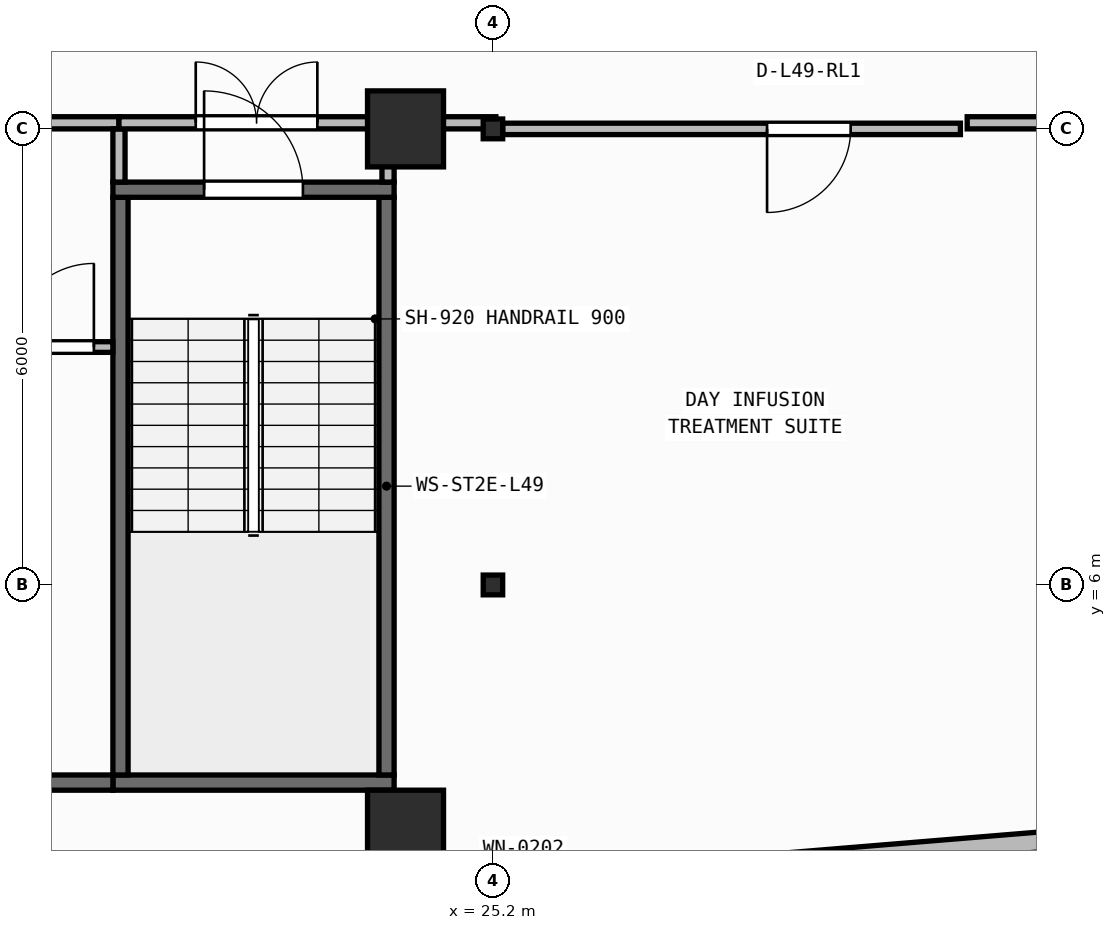
"""IFC4 building model, lengths in metres.
Left out: names, types, materials, properties, quantities, classifications, styles, units other than length and angle.
Written with IfcOpenShell. Run it as: python <this file> out.ifc"""

import sys

from ifc_helpers import new_model, si_unit, direction, frame, frame_2d, origin, origin_2d, place, context, subcontext, project, spatial, rectangle, i_section, extrude, element, fill, save


model = new_model("IFC4")
c1 = context("Model", 3, precision=1e-05, world=origin(), true_north=direction((0.0, 1.0)))
c2 = subcontext(c1, "Body", "Model", "MODEL_VIEW")
j1 = project(units=[si_unit("LENGTHUNIT", "METRE"), si_unit("PLANEANGLEUNIT", "RADIAN")], contexts=[c1])
p1 = place(None, origin())
s1 = spatial("IfcSite", under=j1, at=p1, CompositionType="ELEMENT")
p2 = place(p1, origin())
s2 = spatial("IfcBuilding", under=s1, at=p2, CompositionType="ELEMENT")
p3 = place(p2, frame((0.0, 0.0, 200.0)))
s3 = spatial("IfcBuildingStorey", under=s2, at=p3, CompositionType="ELEMENT", Elevation=200.0)
p4 = place(p3, frame((24.05, 2.8, 0.0), z_axis=(0.0, 0.0, 1.0), x_axis=(1.0, 0.0, 0.0)))
e1 = element("IfcColumn", 1, at=p4, inside=s3, PredefinedType="COLUMN", context=c2, shape_type="SweptSolid", body=[
    extrude(rectangle(XDim=1.0, YDim=1.0, at=origin_2d()), origin(), (0.0, 0.0, 1.0), 3.95),
])
p5 = place(p3, frame((25.2, 6.0, 0.0), z_axis=(0.0, 0.0, 1.0), x_axis=(1.0, 0.0, 0.0)))
e2 = element("IfcColumn", 2, at=p5, inside=s3, PredefinedType="COLUMN", context=c2, shape_type="SweptSolid", body=[
    extrude(i_section(OverallWidth=0.256, OverallDepth=0.26, WebThickness=0.01, FlangeThickness=0.017, FilletRadius=0.013, at=origin_2d()), origin(), (0.0, 0.0, 1.0), 3.95),
])
p6 = place(p3, frame((24.05, 12.0, 0.0), z_axis=(0.0, 0.0, 1.0), x_axis=(1.0, 0.0, 0.0)))
e3 = element("IfcColumn", 3, at=p6, inside=s3, PredefinedType="COLUMN", context=c2, shape_type="SweptSolid", body=[
    extrude(rectangle(XDim=1.0, YDim=1.0, at=origin_2d()), origin(), (0.0, 0.0, 1.0), 3.95),
])
p7 = place(p3, frame((25.2, 12.0, 0.0), z_axis=(0.0, 0.0, 1.0), x_axis=(1.0, 0.0, 0.0)))
e4 = element("IfcColumn", 4, at=p7, inside=s3, PredefinedType="COLUMN", context=c2, shape_type="SweptSolid", body=[
    extrude(i_section(OverallWidth=0.256, OverallDepth=0.26, WebThickness=0.01, FlangeThickness=0.017, FilletRadius=0.013, at=origin_2d()), origin(), (0.0, 0.0, 1.0), 3.95),
])
p8 = place(p3, frame((2.66, 0.174, 0.0), z_axis=(0.0, 0.0, 1.0), x_axis=(0.996634028439, 0.081979347142, 0.0)))
e5 = element("IfcWall", 5, at=p8, inside=s3, PredefinedType="STANDARD", context=c2, shape_type="SweptSolid", body=[
    extrude(rectangle(XDim=46.035, YDim=0.26, at=frame_2d((23.018, 0.0))), origin(), (0.0, 0.0, 1.0), 3.71),
])
p9 = place(p8, frame((21.817, 0.0, 0.9)))
e6 = element("IfcOpeningElement", 6, at=p9, cuts=e5, PredefinedType="OPENING", context=c2, shape_type="SweptSolid", body=[
    extrude(rectangle(XDim=2.4, YDim=1.65, at=frame_2d((1.2, 0.825))), frame((0.0, 0.14, 0.0), z_axis=(0.0, -1.0, 0.0), x_axis=(1.0, 0.0, 0.0)), (0.0, 0.0, 1.0), 0.28),
])
p10 = place(p3, frame((20.2, 3.4, 0.0), z_axis=(0.0, 0.0, 1.0), x_axis=(1.0, 0.0, 0.0)))
e7 = element("IfcWall", 7, at=p10, inside=s3, PredefinedType="SHEAR", context=c2, shape_type="SweptSolid", body=[
    extrude(rectangle(XDim=3.7, YDim=0.2, at=frame_2d((1.85, 0.0))), origin(), (0.0, 0.0, 1.0), 3.71),
])
for number, where, z_axis, x_axis in (
    (8, (20.3, 3.5, 0.0), (0.0, 0.0, 1.0), (0.0, 1.0, 0.0)),
    (9, (23.8, 3.5, 0.0), (0.0, 0.0, 1.0), (0.0, 1.0, 0.0)),
):
    element("IfcWall", number, at=place(p3, frame(where, z_axis=z_axis, x_axis=x_axis)), inside=s3, PredefinedType="SHEAR", context=c2, shape_type="SweptSolid", body=[
        extrude(rectangle(XDim=7.6, YDim=0.2, at=frame_2d((3.8, 0.0))), origin(), (0.0, 0.0, 1.0), 3.71),
    ])
p11 = place(p3, frame((20.2, 11.2, 0.0), z_axis=(0.0, 0.0, 1.0), x_axis=(1.0, 0.0, 0.0)))
e10 = element("IfcWall", 10, at=p11, inside=s3, PredefinedType="SHEAR", context=c2, shape_type="SweptSolid", body=[
    extrude(rectangle(XDim=3.7, YDim=0.2, at=frame_2d((1.85, 0.0))), origin(), (0.0, 0.0, 1.0), 3.71),
])
p12 = place(p11, frame((1.2, 0.0, 0.0)))
e11 = element("IfcOpeningElement", 11, at=p12, cuts=e10, PredefinedType="OPENING", context=c2, shape_type="SweptSolid", body=[
    extrude(rectangle(XDim=1.3, YDim=2.15, at=frame_2d((0.65, 1.075))), frame((0.0, 0.11, 0.0), z_axis=(0.0, -1.0, 0.0), x_axis=(1.0, 0.0, 0.0)), (0.0, 0.0, 1.0), 0.22),
])
p13 = place(p3, frame((6.5, 3.4, 0.0), z_axis=(0.0, 0.0, 1.0), x_axis=(1.0, 0.0, 0.0)))
e12 = element("IfcWall", 12, at=p13, inside=s3, PredefinedType="SHEAR", context=c2, shape_type="SweptSolid", body=[
    extrude(rectangle(XDim=13.7, YDim=0.2, at=frame_2d((6.85, 0.0))), origin(), (0.0, 0.0, 1.0), 3.71),
])
p14 = place(p3, frame((18.61, 9.13, 0.0), z_axis=(0.0, 0.0, 1.0), x_axis=(1.0, 0.0, 0.0)))
e13 = element("IfcWall", 13, at=p14, inside=s3, PredefinedType="PARTITIONING", context=c2, shape_type="SweptSolid", body=[
    extrude(rectangle(XDim=1.59, YDim=0.14, at=frame_2d((0.795, 0.0))), origin(), (0.0, 0.0, 1.0), 3.71),
])
p15 = place(p14, frame((0.24, 0.0, 0.0)))
e14 = element("IfcOpeningElement", 14, at=p15, cuts=e13, PredefinedType="OPENING", context=c2, shape_type="SweptSolid", body=[
    extrude(rectangle(XDim=1.1, YDim=2.1, at=frame_2d((0.55, 1.05))), frame((0.0, 0.08, 0.0), z_axis=(0.0, -1.0, 0.0), x_axis=(1.0, 0.0, 0.0)), (0.0, 0.0, 1.0), 0.16),
])
p16 = place(p3, frame((12.58, 12.08, 0.0), z_axis=(0.0, 0.0, 1.0), x_axis=(1.0, 0.0, 0.0)))
e15 = element("IfcWall", 15, at=p16, inside=s3, PredefinedType="PARTITIONING", context=c2, shape_type="SweptSolid", body=[
    extrude(rectangle(XDim=7.7, YDim=0.16, at=frame_2d((3.85, 0.0))), origin(), (0.0, 0.0, 1.0), 3.152),
])
p17 = place(p16, frame((3.05, 0.0, 0.0)))
e16 = element("IfcOpeningElement", 16, at=p17, cuts=e15, PredefinedType="OPENING", context=c2, shape_type="SweptSolid", body=[
    extrude(rectangle(XDim=1.6, YDim=2.05, at=frame_2d((0.8, 1.025))), frame((0.0, 0.09, 0.0), z_axis=(0.0, -1.0, 0.0), x_axis=(1.0, 0.0, 0.0)), (0.0, 0.0, 1.0), 0.18),
])
p18 = place(p3, frame((20.28, 11.3, 0.0), z_axis=(0.0, 0.0, 1.0), x_axis=(0.0, 1.0, 0.0)))
e17 = element("IfcWall", 17, at=p18, inside=s3, PredefinedType="PARTITIONING", context=c2, shape_type="SweptSolid", body=[
    extrude(rectangle(XDim=0.7, YDim=0.16, at=frame_2d((0.35, 0.0))), origin(), (0.0, 0.0, 1.0), 3.71),
])
p19 = place(p3, frame((20.28, 12.08, 0.0), z_axis=(0.0, 0.0, 1.0), x_axis=(1.0, 0.0, 0.0)))
e18 = element("IfcWall", 18, at=p19, inside=s3, PredefinedType="PARTITIONING", context=c2, shape_type="SweptSolid", body=[
    extrude(rectangle(XDim=3.62, YDim=0.16, at=frame_2d((1.81, 0.0))), origin(), (0.0, 0.0, 1.0), 3.152),
])
p20 = place(p19, frame((1.01, 0.0, 0.0)))
e19 = element("IfcOpeningElement", 19, at=p20, cuts=e18, PredefinedType="OPENING", context=c2, shape_type="SweptSolid", body=[
    extrude(rectangle(XDim=1.6, YDim=2.05, at=frame_2d((0.8, 1.025))), frame((0.0, 0.09, 0.0), z_axis=(0.0, -1.0, 0.0), x_axis=(1.0, 0.0, 0.0)), (0.0, 0.0, 1.0), 0.18),
])
p21 = place(p3, frame((23.82, 11.3, 0.0), z_axis=(0.0, 0.0, 1.0), x_axis=(0.0, 1.0, 0.0)))
e20 = element("IfcWall", 20, at=p21, inside=s3, PredefinedType="PARTITIONING", context=c2, shape_type="SweptSolid", body=[
    extrude(rectangle(XDim=0.7, YDim=0.16, at=frame_2d((0.35, 0.0))), origin(), (0.0, 0.0, 1.0), 3.71),
])
p22 = place(p3, frame((31.35, 12.0, 0.0), z_axis=(0.0, 0.0, 1.0), x_axis=(-1.0, 0.0, 0.0)))
e21 = element("IfcWall", 21, at=p22, inside=s3, PredefinedType="PARTITIONING", context=c2, shape_type="SweptSolid", body=[
    extrude(rectangle(XDim=6.022, YDim=0.15, at=frame_2d((3.011, 0.0))), origin(), (0.0, 0.0, 1.0), 3.152),
])
p23 = place(p22, frame((1.444, 0.0, 0.0)))
e22 = element("IfcOpeningElement", 22, at=p23, cuts=e21, PredefinedType="OPENING", context=c2, shape_type="SweptSolid", body=[
    extrude(rectangle(XDim=1.1, YDim=2.1, at=frame_2d((0.55, 1.05))), frame((0.0, 0.085, 0.0), z_axis=(0.0, -1.0, 0.0), x_axis=(1.0, 0.0, 0.0)), (0.0, 0.0, 1.0), 0.17),
])
p24 = place(p3, frame((24.02, 12.08, 0.0), z_axis=(0.0, 0.0, 1.0), x_axis=(1.0, 0.0, 0.0)))
e23 = element("IfcWall", 23, at=p24, inside=s3, PredefinedType="PARTITIONING", context=c2, shape_type="SweptSolid", body=[
    extrude(rectangle(XDim=1.219, YDim=0.16, at=frame_2d((0.609, 0.0))), origin(), (0.0, 0.0, 1.0), 3.152),
])
p25 = place(p3, frame((31.439, 12.08, 0.0), z_axis=(0.0, 0.0, 1.0), x_axis=(1.0, 0.0, 0.0)))
e24 = element("IfcWall", 24, at=p25, inside=s3, PredefinedType="PARTITIONING", context=c2, shape_type="SweptSolid", body=[
    extrude(rectangle(XDim=2.199, YDim=0.16, at=frame_2d((1.1, 0.0))), origin(), (0.0, 0.0, 1.0), 3.152),
])
p26 = place(p12, origin())
e25 = element("IfcDoor", 25, at=p26, inside=s3, OperationType="SINGLE_SWING_LEFT", PredefinedType="DOOR", context=c2, shape_type="SweptSolid", body=[
    extrude(rectangle(XDim=1.3, YDim=2.15, at=frame_2d((0.65, 1.075))), frame((0.0, 0.025, 0.0), z_axis=(0.0, -1.0, 0.0), x_axis=(1.0, 0.0, 0.0)), (0.0, 0.0, 1.0), 0.05),
])
fill(e11, e25)
p27 = place(p15, origin())
e26 = element("IfcDoor", 26, at=p27, inside=s3, OperationType="SINGLE_SWING_RIGHT", PredefinedType="DOOR", context=c2, shape_type="SweptSolid", body=[
    extrude(rectangle(XDim=1.1, YDim=2.1, at=frame_2d((0.55, 1.05))), frame((0.0, 0.025, 0.0), z_axis=(0.0, -1.0, 0.0), x_axis=(1.0, 0.0, 0.0)), (0.0, 0.0, 1.0), 0.05),
])
fill(e14, e26)
p28 = place(p20, origin())
e27 = element("IfcDoor", 27, at=p28, inside=s3, OperationType="DOUBLE_DOOR_SINGLE_SWING", PredefinedType="DOOR", context=c2, shape_type="SweptSolid", body=[
    extrude(rectangle(XDim=1.6, YDim=2.05, at=frame_2d((0.8, 1.025))), frame((0.0, 0.025, 0.0), z_axis=(0.0, -1.0, 0.0), x_axis=(1.0, 0.0, 0.0)), (0.0, 0.0, 1.0), 0.05),
])
fill(e19, e27)
p29 = place(p23, origin())
e28 = element("IfcDoor", 28, at=p29, inside=s3, OperationType="SINGLE_SWING_RIGHT", PredefinedType="DOOR", context=c2, shape_type="SweptSolid", body=[
    extrude(rectangle(XDim=1.1, YDim=2.1, at=frame_2d((0.55, 1.05))), frame((0.0, 0.025, 0.0), z_axis=(0.0, -1.0, 0.0), x_axis=(1.0, 0.0, 0.0)), (0.0, 0.0, 1.0), 0.05),
])
fill(e22, e28)
save(model, sys.argv[1])
